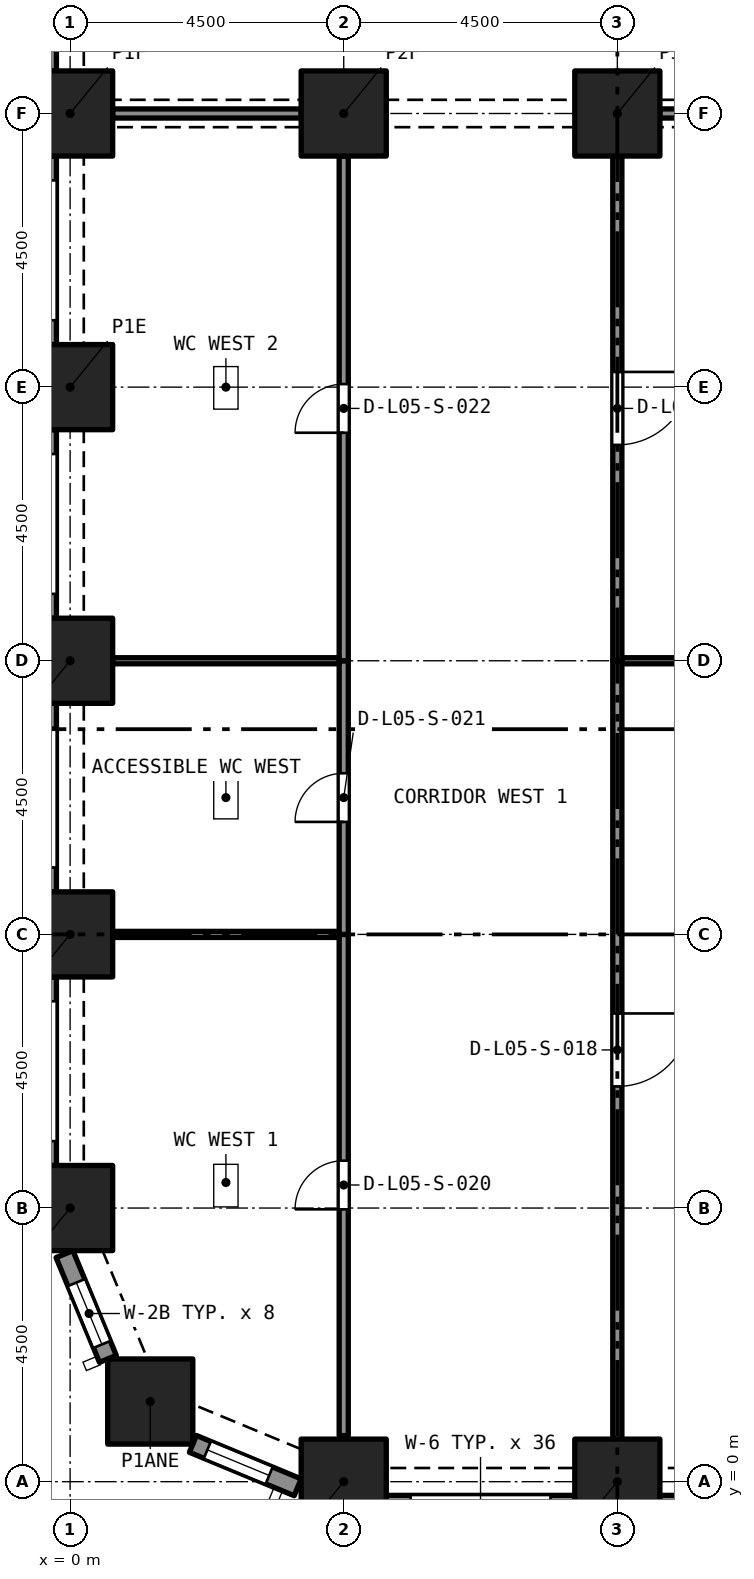
"""IFC4 building model, lengths in metres.
Left out: names, types, materials, properties, quantities, classifications, styles, units other than length and angle.
Written with IfcOpenShell. Run it as: python <this file> out.ifc"""

import sys

from ifc_helpers import new_model, si_unit, direction, frame, frame_2d, origin, origin_2d, place, context, subcontext, project, spatial, rectangle, extrude, element, fill, save


model = new_model("IFC4")
c1 = context("Model", 3, precision=1e-05, world=origin(), true_north=direction((0.0, 1.0)))
c2 = subcontext(c1, "Body", "Model", "MODEL_VIEW")
j1 = project(units=[si_unit("LENGTHUNIT", "METRE"), si_unit("PLANEANGLEUNIT", "RADIAN")], contexts=[c1])
p1 = place(None, origin())
s1 = spatial("IfcSite", under=j1, at=p1, CompositionType="ELEMENT")
p2 = place(p1, origin())
s2 = spatial("IfcBuilding", under=s1, at=p2, CompositionType="ELEMENT")
p3 = place(p2, frame((0.0, 0.0, 26.0)))
s3 = spatial("IfcBuildingStorey", under=s2, at=p3, CompositionType="ELEMENT", Elevation=26.0)
for number, where, z_axis, x_axis in (
    (1, (4.5, 0.0, 0.0), (0.0, 0.0, 1.0), (1.0, 0.0, 0.0)),
    (2, (9.0, 0.0, 0.0), (0.0, 0.0, 1.0), (1.0, 0.0, 0.0)),
    (3, (1.318, 1.318, 0.0), (0.0, 0.0, 1.0), (1.0, 0.0, 0.0)),
    (4, (0.0, 4.5, 0.0), (0.0, 0.0, 1.0), (1.0, 0.0, 0.0)),
    (5, (0.0, 9.0, 0.0), (0.0, 0.0, 1.0), (1.0, 0.0, 0.0)),
    (6, (0.0, 13.5, 0.0), (0.0, 0.0, 1.0), (1.0, 0.0, 0.0)),
    (7, (0.0, 18.0, 0.0), (0.0, 0.0, 1.0), (1.0, 0.0, 0.0)),
    (8, (0.0, 22.5, 0.0), (0.0, 0.0, 1.0), (1.0, 0.0, 0.0)),
    (9, (4.5, 22.5, 0.0), (0.0, 0.0, 1.0), (1.0, 0.0, 0.0)),
    (10, (9.0, 22.5, 0.0), (0.0, 0.0, 1.0), (1.0, 0.0, 0.0)),
):
    element("IfcColumn", number, at=place(p3, frame(where, z_axis=z_axis, x_axis=x_axis)), inside=s3, PredefinedType="COLUMN", context=c2, shape_type="SweptSolid", body=[
        extrude(rectangle(XDim=1.4, YDim=1.4, at=origin_2d()), origin(), (0.0, 0.0, 1.0), 4.4),
    ])
p4 = place(p3, frame((0.622, 2.02, 0.0), z_axis=(0.0, 0.0, 1.0), x_axis=(-0.38262540684, 0.923903565336, 0.0)))
e11 = element("IfcWall", 11, at=p4, inside=s3, PredefinedType="SOLIDWALL", context=c2, shape_type="SweptSolid", body=[
    extrude(rectangle(XDim=1.865, YDim=0.3, at=frame_2d((0.933, 0.0))), origin(), (0.0, 0.0, 1.0), 4.4),
])
p5 = place(p4, frame((0.258, 0.0, 0.45)))
e12 = element("IfcOpeningElement", 12, at=p5, cuts=e11, PredefinedType="OPENING", context=c2, shape_type="SweptSolid", body=[
    extrude(rectangle(XDim=1.1, YDim=2.55, at=frame_2d((0.55, 1.275))), frame((0.0, 0.16, 0.0), z_axis=(0.0, -1.0, 0.0), x_axis=(1.0, 0.0, 0.0)), (0.0, 0.0, 1.0), 0.32),
])
p6 = place(p3, frame((3.743, -0.092, 0.0), z_axis=(0.0, 0.0, 1.0), x_axis=(-0.923857286003, 0.382737135771, 0.0)))
e13 = element("IfcWall", 13, at=p6, inside=s3, PredefinedType="SOLIDWALL", context=c2, shape_type="SweptSolid", body=[
    extrude(rectangle(XDim=1.865, YDim=0.3, at=frame_2d((0.933, 0.0))), origin(), (0.0, 0.0, 1.0), 4.4),
])
p7 = place(p6, frame((0.508, 0.0, 0.45)))
e14 = element("IfcOpeningElement", 14, at=p7, cuts=e13, PredefinedType="OPENING", context=c2, shape_type="SweptSolid", body=[
    extrude(rectangle(XDim=1.1, YDim=2.55, at=frame_2d((0.55, 1.275))), frame((0.0, 0.16, 0.0), z_axis=(0.0, -1.0, 0.0), x_axis=(1.0, 0.0, 0.0)), (0.0, 0.0, 1.0), 0.32),
])
p8 = place(p3, frame((8.3, -0.375, 0.0), z_axis=(0.0, 0.0, 1.0), x_axis=(-1.0, 0.0, 0.0)))
e15 = element("IfcWall", 15, at=p8, inside=s3, PredefinedType="SOLIDWALL", context=c2, shape_type="SweptSolid", body=[
    extrude(rectangle(XDim=3.1, YDim=0.3, at=frame_2d((1.55, 0.0))), origin(), (0.0, 0.0, 1.0), 4.4),
])
p9 = place(p8, frame((0.4, 0.0, 0.45)))
e16 = element("IfcOpeningElement", 16, at=p9, cuts=e15, PredefinedType="OPENING", context=c2, shape_type="SweptSolid", body=[
    extrude(rectangle(XDim=2.3, YDim=2.55, at=frame_2d((1.15, 1.275))), frame((0.0, 0.16, 0.0), z_axis=(0.0, -1.0, 0.0), x_axis=(1.0, 0.0, 0.0)), (0.0, 0.0, 1.0), 0.32),
])
p10 = place(p3, frame((12.8, -0.375, 0.0), z_axis=(0.0, 0.0, 1.0), x_axis=(-1.0, 0.0, 0.0)))
e17 = element("IfcWall", 17, at=p10, inside=s3, PredefinedType="SOLIDWALL", context=c2, shape_type="SweptSolid", body=[
    extrude(rectangle(XDim=3.1, YDim=0.3, at=frame_2d((1.55, 0.0))), origin(), (0.0, 0.0, 1.0), 4.4),
])
p11 = place(p10, frame((0.4, 0.0, 0.45)))
e18 = element("IfcOpeningElement", 18, at=p11, cuts=e17, PredefinedType="OPENING", context=c2, shape_type="SweptSolid", body=[
    extrude(rectangle(XDim=2.3, YDim=2.55, at=frame_2d((1.15, 1.275))), frame((0.0, 0.16, 0.0), z_axis=(0.0, -1.0, 0.0), x_axis=(1.0, 0.0, 0.0)), (0.0, 0.0, 1.0), 0.32),
])
p12 = place(p3, frame((-0.375, 23.2, 0.0), z_axis=(0.0, 0.0, 1.0), x_axis=(0.0, 1.0, 0.0)))
e19 = element("IfcWall", 19, at=p12, inside=s3, PredefinedType="SOLIDWALL", context=c2, shape_type="SweptSolid", body=[
    extrude(rectangle(XDim=3.1, YDim=0.3, at=frame_2d((1.55, 0.0))), origin(), (0.0, 0.0, 1.0), 4.4),
])
p13 = place(p12, frame((0.4, 0.0, 0.45)))
e20 = element("IfcOpeningElement", 20, at=p13, cuts=e19, PredefinedType="OPENING", context=c2, shape_type="SweptSolid", body=[
    extrude(rectangle(XDim=2.3, YDim=2.55, at=frame_2d((1.15, 1.275))), frame((0.0, 0.16, 0.0), z_axis=(0.0, -1.0, 0.0), x_axis=(1.0, 0.0, 0.0)), (0.0, 0.0, 1.0), 0.32),
])
p14 = place(p3, frame((-0.375, 18.7, 0.0), z_axis=(0.0, 0.0, 1.0), x_axis=(0.0, 1.0, 0.0)))
e21 = element("IfcWall", 21, at=p14, inside=s3, PredefinedType="SOLIDWALL", context=c2, shape_type="SweptSolid", body=[
    extrude(rectangle(XDim=3.1, YDim=0.3, at=frame_2d((1.55, 0.0))), origin(), (0.0, 0.0, 1.0), 4.4),
])
p15 = place(p14, frame((0.4, 0.0, 0.45)))
e22 = element("IfcOpeningElement", 22, at=p15, cuts=e21, PredefinedType="OPENING", context=c2, shape_type="SweptSolid", body=[
    extrude(rectangle(XDim=2.3, YDim=2.55, at=frame_2d((1.15, 1.275))), frame((0.0, 0.16, 0.0), z_axis=(0.0, -1.0, 0.0), x_axis=(1.0, 0.0, 0.0)), (0.0, 0.0, 1.0), 0.32),
])
p16 = place(p3, frame((-0.375, 14.2, 0.0), z_axis=(0.0, 0.0, 1.0), x_axis=(0.0, 1.0, 0.0)))
e23 = element("IfcWall", 23, at=p16, inside=s3, PredefinedType="SOLIDWALL", context=c2, shape_type="SweptSolid", body=[
    extrude(rectangle(XDim=3.1, YDim=0.3, at=frame_2d((1.55, 0.0))), origin(), (0.0, 0.0, 1.0), 4.4),
])
p17 = place(p16, frame((0.4, 0.0, 0.45)))
e24 = element("IfcOpeningElement", 24, at=p17, cuts=e23, PredefinedType="OPENING", context=c2, shape_type="SweptSolid", body=[
    extrude(rectangle(XDim=2.3, YDim=2.55, at=frame_2d((1.15, 1.275))), frame((0.0, 0.16, 0.0), z_axis=(0.0, -1.0, 0.0), x_axis=(1.0, 0.0, 0.0)), (0.0, 0.0, 1.0), 0.32),
])
p18 = place(p3, frame((-0.375, 9.7, 0.0), z_axis=(0.0, 0.0, 1.0), x_axis=(0.0, 1.0, 0.0)))
e25 = element("IfcWall", 25, at=p18, inside=s3, PredefinedType="SOLIDWALL", context=c2, shape_type="SweptSolid", body=[
    extrude(rectangle(XDim=3.1, YDim=0.3, at=frame_2d((1.55, 0.0))), origin(), (0.0, 0.0, 1.0), 4.4),
])
p19 = place(p18, frame((0.4, 0.0, 0.45)))
e26 = element("IfcOpeningElement", 26, at=p19, cuts=e25, PredefinedType="OPENING", context=c2, shape_type="SweptSolid", body=[
    extrude(rectangle(XDim=2.3, YDim=2.55, at=frame_2d((1.15, 1.275))), frame((0.0, 0.16, 0.0), z_axis=(0.0, -1.0, 0.0), x_axis=(1.0, 0.0, 0.0)), (0.0, 0.0, 1.0), 0.32),
])
p20 = place(p3, frame((-0.375, 5.2, 0.0), z_axis=(0.0, 0.0, 1.0), x_axis=(0.0, 1.0, 0.0)))
e27 = element("IfcWall", 27, at=p20, inside=s3, PredefinedType="SOLIDWALL", context=c2, shape_type="SweptSolid", body=[
    extrude(rectangle(XDim=3.1, YDim=0.3, at=frame_2d((1.55, 0.0))), origin(), (0.0, 0.0, 1.0), 4.4),
])
p21 = place(p20, frame((0.4, 0.0, 0.45)))
e28 = element("IfcOpeningElement", 28, at=p21, cuts=e27, PredefinedType="OPENING", context=c2, shape_type="SweptSolid", body=[
    extrude(rectangle(XDim=2.3, YDim=2.55, at=frame_2d((1.15, 1.275))), frame((0.0, 0.16, 0.0), z_axis=(0.0, -1.0, 0.0), x_axis=(1.0, 0.0, 0.0)), (0.0, 0.0, 1.0), 0.32),
])
for number, where, z_axis, x_axis in (
    (29, (9.7, 22.5, 0.0), (0.0, 0.0, 1.0), (1.0, 0.0, 0.0)),
    (30, (0.7, 22.5, 0.0), (0.0, 0.0, 1.0), (1.0, 0.0, 0.0)),
):
    element("IfcWall", number, at=place(p3, frame(where, z_axis=z_axis, x_axis=x_axis)), inside=s3, PredefinedType="PARTITIONING", context=c2, shape_type="SweptSolid", body=[
        extrude(rectangle(XDim=3.1, YDim=0.15, at=frame_2d((1.55, 0.0))), origin(), (0.0, 0.0, 1.0), 3.58),
    ])
p22 = place(p3, frame((9.075, 13.5, 0.0), z_axis=(0.0, 0.0, 1.0), x_axis=(1.0, 0.0, 0.0)))
e31 = element("IfcWall", 31, at=p22, inside=s3, PredefinedType="PARTITIONING", context=c2, shape_type="SweptSolid", body=[
    extrude(rectangle(XDim=8.225, YDim=0.1, at=frame_2d((4.113, 0.0))), origin(), (0.0, 0.0, 1.0), 4.1),
])
p23 = place(p3, frame((9.0, 13.5, 0.0), z_axis=(0.0, 0.0, 1.0), x_axis=(0.0, -1.0, 0.0)))
e32 = element("IfcWall", 32, at=p23, inside=s3, PredefinedType="PARTITIONING", context=c2, shape_type="SweptSolid", body=[
    extrude(rectangle(XDim=12.8, YDim=0.15, at=frame_2d((6.4, 0.0))), origin(), (0.0, 0.0, 1.0), 4.1),
])
p24 = place(p23, frame((5.8, 0.0, 0.0)))
e33 = element("IfcOpeningElement", 33, at=p24, cuts=e32, PredefinedType="OPENING", context=c2, shape_type="SweptSolid", body=[
    extrude(rectangle(XDim=1.2, YDim=2.1, at=frame_2d((0.6, 1.05))), frame((0.0, 0.085, 0.0), z_axis=(0.0, -1.0, 0.0), x_axis=(1.0, 0.0, 0.0)), (0.0, 0.0, 1.0), 0.17),
])
p25 = place(p3, frame((9.0, 21.8, 0.0), z_axis=(0.0, 0.0, 1.0), x_axis=(0.0, -1.0, 0.0)))
e34 = element("IfcWall", 34, at=p25, inside=s3, PredefinedType="PARTITIONING", context=c2, shape_type="SweptSolid", body=[
    extrude(rectangle(XDim=8.3, YDim=0.15, at=frame_2d((4.15, 0.0))), origin(), (0.0, 0.0, 1.0), 4.1),
])
p26 = place(p25, frame((3.55, 0.0, 0.0)))
e35 = element("IfcOpeningElement", 35, at=p26, cuts=e34, PredefinedType="OPENING", context=c2, shape_type="SweptSolid", body=[
    extrude(rectangle(XDim=1.2, YDim=2.1, at=frame_2d((0.6, 1.05))), frame((0.0, 0.085, 0.0), z_axis=(0.0, -1.0, 0.0), x_axis=(1.0, 0.0, 0.0)), (0.0, 0.0, 1.0), 0.17),
])
p27 = place(p3, frame((4.5, 0.758, 0.0), z_axis=(0.0, 0.0, 1.0), x_axis=(0.0, 1.0, 0.0)))
e36 = element("IfcWall", 36, at=p27, inside=s3, PredefinedType="PARTITIONING", context=c2, shape_type="SweptSolid", body=[
    extrude(rectangle(XDim=8.242, YDim=0.15, at=frame_2d((4.121, 0.0))), origin(), (0.0, 0.0, 1.0), 4.1),
])
p28 = place(p27, frame((3.721, 0.0, 0.0)))
e37 = element("IfcOpeningElement", 37, at=p28, cuts=e36, PredefinedType="OPENING", context=c2, shape_type="SweptSolid", body=[
    extrude(rectangle(XDim=0.8, YDim=2.1, at=frame_2d((0.4, 1.05))), frame((0.0, 0.085, 0.0), z_axis=(0.0, -1.0, 0.0), x_axis=(1.0, 0.0, 0.0)), (0.0, 0.0, 1.0), 0.17),
])
p29 = place(p3, frame((4.5, 9.0, 0.0), z_axis=(0.0, 0.0, 1.0), x_axis=(0.0, 1.0, 0.0)))
e38 = element("IfcWall", 38, at=p29, inside=s3, PredefinedType="PARTITIONING", context=c2, shape_type="SweptSolid", body=[
    extrude(rectangle(XDim=4.5, YDim=0.15, at=frame_2d((2.25, 0.0))), origin(), (0.0, 0.0, 1.0), 4.1),
])
p30 = place(p29, frame((1.85, 0.0, 0.0)))
e39 = element("IfcOpeningElement", 39, at=p30, cuts=e38, PredefinedType="OPENING", context=c2, shape_type="SweptSolid", body=[
    extrude(rectangle(XDim=0.8, YDim=2.1, at=frame_2d((0.4, 1.05))), frame((0.0, 0.085, 0.0), z_axis=(0.0, -1.0, 0.0), x_axis=(1.0, 0.0, 0.0)), (0.0, 0.0, 1.0), 0.17),
])
p31 = place(p3, frame((4.5, 13.5, 0.0), z_axis=(0.0, 0.0, 1.0), x_axis=(0.0, 1.0, 0.0)))
e40 = element("IfcWall", 40, at=p31, inside=s3, PredefinedType="PARTITIONING", context=c2, shape_type="SweptSolid", body=[
    extrude(rectangle(XDim=8.3, YDim=0.15, at=frame_2d((4.15, 0.0))), origin(), (0.0, 0.0, 1.0), 4.1),
])
p32 = place(p31, frame((3.75, 0.0, 0.0)))
e41 = element("IfcOpeningElement", 41, at=p32, cuts=e40, PredefinedType="OPENING", context=c2, shape_type="SweptSolid", body=[
    extrude(rectangle(XDim=0.8, YDim=2.1, at=frame_2d((0.4, 1.05))), frame((0.0, 0.085, 0.0), z_axis=(0.0, -1.0, 0.0), x_axis=(1.0, 0.0, 0.0)), (0.0, 0.0, 1.0), 0.17),
])
for number, where, z_axis, x_axis in (
    (42, (0.7, 9.0, 0.0), (0.0, 0.0, 1.0), (1.0, 0.0, 0.0)),
    (43, (0.7, 13.5, 0.0), (0.0, 0.0, 1.0), (1.0, 0.0, 0.0)),
):
    element("IfcWall", number, at=place(p3, frame(where, z_axis=z_axis, x_axis=x_axis)), inside=s3, PredefinedType="PARTITIONING", context=c2, shape_type="SweptSolid", body=[
        extrude(rectangle(XDim=3.725, YDim=0.1, at=frame_2d((1.863, 0.0))), origin(), (0.0, 0.0, 1.0), 4.1),
    ])
p33 = place(p5, origin())
e44 = element("IfcWindow", 44, at=p33, inside=s3, PartitioningType="SINGLE_PANEL", PredefinedType="WINDOW", context=c2, shape_type="SweptSolid", body=[
    extrude(rectangle(XDim=1.1, YDim=2.55, at=frame_2d((0.55, 1.275))), frame((0.0, 0.03, 0.0), z_axis=(0.0, -1.0, 0.0), x_axis=(1.0, 0.0, 0.0)), (0.0, 0.0, 1.0), 0.06),
])
fill(e12, e44)
p34 = place(p7, origin())
e45 = element("IfcWindow", 45, at=p34, inside=s3, PartitioningType="SINGLE_PANEL", PredefinedType="WINDOW", context=c2, shape_type="SweptSolid", body=[
    extrude(rectangle(XDim=1.1, YDim=2.55, at=frame_2d((0.55, 1.275))), frame((0.0, 0.03, 0.0), z_axis=(0.0, -1.0, 0.0), x_axis=(1.0, 0.0, 0.0)), (0.0, 0.0, 1.0), 0.06),
])
fill(e14, e45)
p35 = place(p24, origin())
e46 = element("IfcDoor", 46, at=p35, inside=s3, OperationType="SINGLE_SWING_RIGHT", PredefinedType="DOOR", context=c2, shape_type="SweptSolid", body=[
    extrude(rectangle(XDim=1.2, YDim=2.1, at=frame_2d((0.6, 1.05))), frame((0.0, 0.025, 0.0), z_axis=(0.0, -1.0, 0.0), x_axis=(1.0, 0.0, 0.0)), (0.0, 0.0, 1.0), 0.05),
])
fill(e33, e46)
p36 = place(p26, origin())
e47 = element("IfcDoor", 47, at=p36, inside=s3, OperationType="SINGLE_SWING_RIGHT", PredefinedType="DOOR", context=c2, shape_type="SweptSolid", body=[
    extrude(rectangle(XDim=1.2, YDim=2.1, at=frame_2d((0.6, 1.05))), frame((0.0, 0.025, 0.0), z_axis=(0.0, -1.0, 0.0), x_axis=(1.0, 0.0, 0.0)), (0.0, 0.0, 1.0), 0.05),
])
fill(e35, e47)
p37 = place(p28, origin())
e48 = element("IfcDoor", 48, at=p37, inside=s3, OperationType="SINGLE_SWING_RIGHT", PredefinedType="DOOR", context=c2, shape_type="SweptSolid", body=[
    extrude(rectangle(XDim=0.8, YDim=2.1, at=frame_2d((0.4, 1.05))), frame((0.0, 0.025, 0.0), z_axis=(0.0, -1.0, 0.0), x_axis=(1.0, 0.0, 0.0)), (0.0, 0.0, 1.0), 0.05),
])
fill(e37, e48)
p38 = place(p30, origin())
e49 = element("IfcDoor", 49, at=p38, inside=s3, OperationType="SINGLE_SWING_RIGHT", PredefinedType="DOOR", context=c2, shape_type="SweptSolid", body=[
    extrude(rectangle(XDim=0.8, YDim=2.1, at=frame_2d((0.4, 1.05))), frame((0.0, 0.025, 0.0), z_axis=(0.0, -1.0, 0.0), x_axis=(1.0, 0.0, 0.0)), (0.0, 0.0, 1.0), 0.05),
])
fill(e39, e49)
p39 = place(p32, origin())
e50 = element("IfcDoor", 50, at=p39, inside=s3, OperationType="SINGLE_SWING_LEFT", PredefinedType="DOOR", context=c2, shape_type="SweptSolid", body=[
    extrude(rectangle(XDim=0.8, YDim=2.1, at=frame_2d((0.4, 1.05))), frame((0.0, 0.025, 0.0), z_axis=(0.0, -1.0, 0.0), x_axis=(1.0, 0.0, 0.0)), (0.0, 0.0, 1.0), 0.05),
])
fill(e41, e50)
save(model, sys.argv[1])
